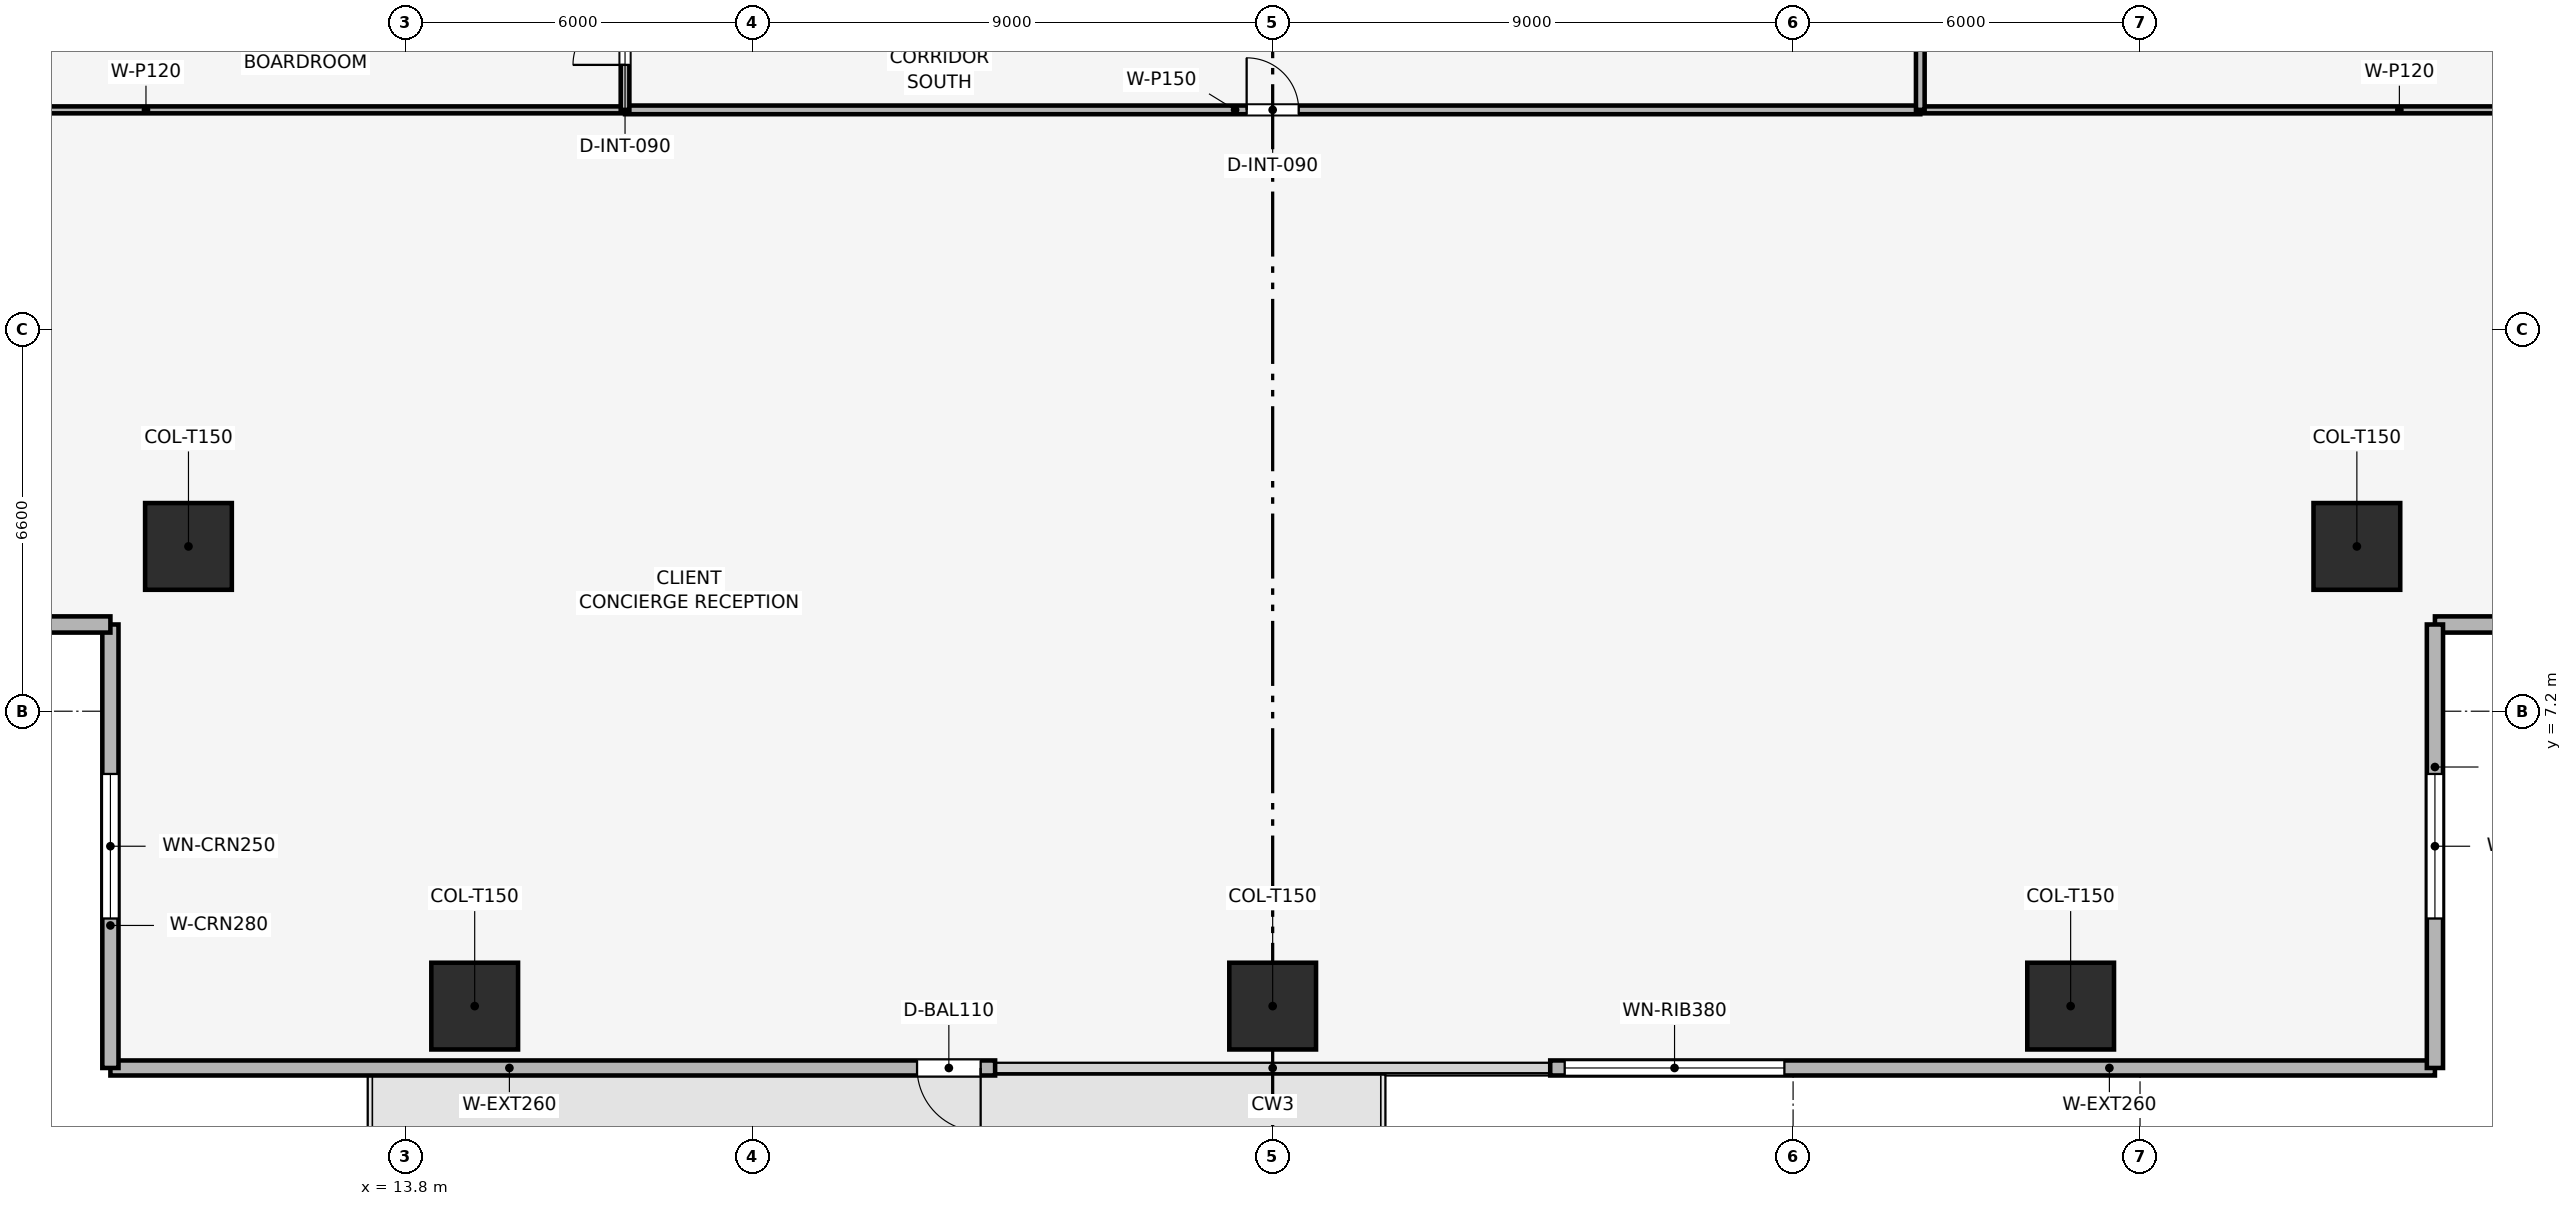
"""IFC4 building model, lengths in metres.
Left out: names, types, materials, properties, quantities, classifications, styles, units other than length and angle.
Written with IfcOpenShell. Run it as: python <this file> out.ifc"""

import sys

from ifc_helpers import new_model, si_unit, direction, frame, frame_2d, origin, origin_2d, place, context, subcontext, project, spatial, rectangle, extrude, element, fill, save


model = new_model("IFC4")
c1 = context("Model", 3, precision=1e-05, world=origin(), true_north=direction((0.0, 1.0)))
c2 = subcontext(c1, "Body", "Model", "MODEL_VIEW")
j1 = project(units=[si_unit("LENGTHUNIT", "METRE"), si_unit("PLANEANGLEUNIT", "RADIAN")], contexts=[c1])
p1 = place(None, origin())
s1 = spatial("IfcSite", under=j1, at=p1, CompositionType="ELEMENT")
p2 = place(p1, origin())
s2 = spatial("IfcBuilding", under=s1, at=p2, CompositionType="ELEMENT")
p3 = place(p2, frame((0.0, 0.0, 100.2)))
s3 = spatial("IfcBuildingStorey", under=s2, at=p3, CompositionType="ELEMENT", Elevation=100.2)
for number, where, z_axis, x_axis in (
    (1, (15.0, 2.1, 0.003), (0.0, 0.0, 1.0), (1.0, 0.0, 0.0)),
    (2, (28.8, 2.1, 0.003), (0.0, 0.0, 1.0), (1.0, 0.0, 0.0)),
    (3, (42.6, 2.1, 0.003), (0.0, 0.0, 1.0), (1.0, 0.0, 0.0)),
    (4, (10.05, 10.05, 0.003), (0.0, 0.0, 1.0), (1.0, 0.0, 0.0)),
    (5, (47.55, 10.05, 0.003), (0.0, 0.0, 1.0), (1.0, 0.0, 0.0)),
):
    element("IfcColumn", number, at=place(p3, frame(where, z_axis=z_axis, x_axis=x_axis)), inside=s3, PredefinedType="COLUMN", context=c2, shape_type="SweptSolid", body=[
        extrude(rectangle(XDim=1.5, YDim=1.5, at=origin_2d()), origin(), (0.0, 0.0, 1.0), 3.644),
    ])
p4 = place(p3, frame((48.9, 1.03, 0.0), z_axis=(0.0, 0.0, 1.0), x_axis=(-1.0, 0.0, 0.0)))
e6 = element("IfcWall", 6, at=p4, inside=s3, PredefinedType="SOLIDWALL", context=c2, shape_type="SweptSolid", body=[
    extrude(rectangle(XDim=15.3, YDim=0.26, at=frame_2d((7.65, 0.0))), origin(), (0.0, 0.0, 1.0), 3.65),
])
p5 = place(p4, frame((11.25, 0.0, 0.9)))
e7 = element("IfcOpeningElement", 7, at=p5, cuts=e6, PredefinedType="OPENING", context=c2, shape_type="SweptSolid", body=[
    extrude(rectangle(XDim=3.8, YDim=1.9, at=frame_2d((1.9, 0.95))), frame((0.0, 0.14, 0.0), z_axis=(0.0, -1.0, 0.0), x_axis=(1.0, 0.0, 0.0)), (0.0, 0.0, 1.0), 0.28),
])
p6 = place(p3, frame((24.0, 1.03, 0.0), z_axis=(0.0, 0.0, 1.0), x_axis=(-1.0, 0.0, 0.0)))
e8 = element("IfcWall", 8, at=p6, inside=s3, PredefinedType="SOLIDWALL", context=c2, shape_type="SweptSolid", body=[
    extrude(rectangle(XDim=15.3, YDim=0.26, at=frame_2d((7.65, 0.0))), origin(), (0.0, 0.0, 1.0), 3.65),
])
p7 = place(p6, frame((0.25, 0.0, 0.0)))
e9 = element("IfcOpeningElement", 9, at=p7, cuts=e8, PredefinedType="OPENING", context=c2, shape_type="SweptSolid", body=[
    extrude(rectangle(XDim=1.1, YDim=2.2, at=frame_2d((0.55, 1.1))), frame((0.0, 0.14, 0.0), z_axis=(0.0, -1.0, 0.0), x_axis=(1.0, 0.0, 0.0)), (0.0, 0.0, 1.0), 0.28),
])
p8 = place(p3, frame((8.7, 1.03, 0.0), z_axis=(0.0, 0.0, 1.0), x_axis=(0.0, 1.0, 0.0)))
e10 = element("IfcWall", 10, at=p8, inside=s3, PredefinedType="SOLIDWALL", context=c2, shape_type="SweptSolid", body=[
    extrude(rectangle(XDim=7.67, YDim=0.28, at=frame_2d((3.835, 0.0))), origin(), (0.0, 0.0, 1.0), 3.65),
])
p9 = place(p8, frame((2.585, 0.0, 0.9)))
e11 = element("IfcOpeningElement", 11, at=p9, cuts=e10, PredefinedType="OPENING", context=c2, shape_type="SweptSolid", body=[
    extrude(rectangle(XDim=2.5, YDim=1.9, at=frame_2d((1.25, 0.95))), frame((0.0, 0.15, 0.0), z_axis=(0.0, -1.0, 0.0), x_axis=(1.0, 0.0, 0.0)), (0.0, 0.0, 1.0), 0.3),
])
p10 = place(p3, frame((8.7, 8.7, 0.0), z_axis=(0.0, 0.0, 1.0), x_axis=(-1.0, 0.0, 0.0)))
e12 = element("IfcWall", 12, at=p10, inside=s3, PredefinedType="SOLIDWALL", context=c2, shape_type="SweptSolid", body=[
    extrude(rectangle(XDim=7.67, YDim=0.28, at=frame_2d((3.835, 0.0))), origin(), (0.0, 0.0, 1.0), 3.65),
])
p11 = place(p10, frame((2.585, 0.0, 0.9)))
e13 = element("IfcOpeningElement", 13, at=p11, cuts=e12, PredefinedType="OPENING", context=c2, shape_type="SweptSolid", body=[
    extrude(rectangle(XDim=2.5, YDim=1.9, at=frame_2d((1.25, 0.95))), frame((0.0, 0.15, 0.0), z_axis=(0.0, -1.0, 0.0), x_axis=(1.0, 0.0, 0.0)), (0.0, 0.0, 1.0), 0.3),
])
p12 = place(p3, frame((56.57, 8.7, 0.0), z_axis=(0.0, 0.0, 1.0), x_axis=(-1.0, 0.0, 0.0)))
e14 = element("IfcWall", 14, at=p12, inside=s3, PredefinedType="SOLIDWALL", context=c2, shape_type="SweptSolid", body=[
    extrude(rectangle(XDim=7.67, YDim=0.28, at=frame_2d((3.835, 0.0))), origin(), (0.0, 0.0, 1.0), 3.65),
])
p13 = place(p12, frame((2.585, 0.0, 0.9)))
e15 = element("IfcOpeningElement", 15, at=p13, cuts=e14, PredefinedType="OPENING", context=c2, shape_type="SweptSolid", body=[
    extrude(rectangle(XDim=2.5, YDim=1.9, at=frame_2d((1.25, 0.95))), frame((0.0, 0.15, 0.0), z_axis=(0.0, -1.0, 0.0), x_axis=(1.0, 0.0, 0.0)), (0.0, 0.0, 1.0), 0.3),
])
p14 = place(p3, frame((48.9, 8.7, 0.0), z_axis=(0.0, 0.0, 1.0), x_axis=(0.0, -1.0, 0.0)))
e16 = element("IfcWall", 16, at=p14, inside=s3, PredefinedType="SOLIDWALL", context=c2, shape_type="SweptSolid", body=[
    extrude(rectangle(XDim=7.67, YDim=0.28, at=frame_2d((3.835, 0.0))), origin(), (0.0, 0.0, 1.0), 3.65),
])
p15 = place(p14, frame((2.585, 0.0, 0.9)))
e17 = element("IfcOpeningElement", 17, at=p15, cuts=e16, PredefinedType="OPENING", context=c2, shape_type="SweptSolid", body=[
    extrude(rectangle(XDim=2.5, YDim=1.9, at=frame_2d((1.25, 0.95))), frame((0.0, 0.15, 0.0), z_axis=(0.0, -1.0, 0.0), x_axis=(1.0, 0.0, 0.0)), (0.0, 0.0, 1.0), 0.3),
])
for number, where, z_axis, x_axis in (
    (18, (1.03, 17.6, 0.0), (0.0, 0.0, 1.0), (1.0, 0.0, 0.0)),
    (19, (40.0, 17.6, 0.0), (0.0, 0.0, 1.0), (1.0, 0.0, 0.0)),
):
    element("IfcWall", number, at=place(p3, frame(where, z_axis=z_axis, x_axis=x_axis)), inside=s3, PredefinedType="PARTITIONING", context=c2, shape_type="SweptSolid", body=[
        extrude(rectangle(XDim=16.57, YDim=0.12, at=frame_2d((8.285, 0.0))), origin(), (0.0, 0.0, 1.0), 2.935),
    ])
p16 = place(p3, frame((17.6, 17.6, 0.0), z_axis=(0.0, 0.0, 1.0), x_axis=(1.0, 0.0, 0.0)))
e20 = element("IfcWall", 20, at=p16, inside=s3, PredefinedType="PARTITIONING", context=c2, shape_type="SweptSolid", body=[
    extrude(rectangle(XDim=22.4, YDim=0.15, at=frame_2d((11.2, 0.0))), origin(), (0.0, 0.0, 1.0), 3.085),
])
p17 = place(p16, frame((10.75, 0.0, 0.0)))
e21 = element("IfcOpeningElement", 21, at=p17, cuts=e20, PredefinedType="OPENING", context=c2, shape_type="SweptSolid", body=[
    extrude(rectangle(XDim=0.9, YDim=2.1, at=frame_2d((0.45, 1.05))), frame((0.0, 0.085, 0.0), z_axis=(0.0, -1.0, 0.0), x_axis=(1.0, 0.0, 0.0)), (0.0, 0.0, 1.0), 0.17),
])
p18 = place(p3, frame((17.6, 17.6, 0.0), z_axis=(0.0, 0.0, 1.0), x_axis=(0.0, 1.0, 0.0)))
e22 = element("IfcWall", 22, at=p18, inside=s3, PredefinedType="PARTITIONING", context=c2, shape_type="SweptSolid", body=[
    extrude(rectangle(XDim=22.4, YDim=0.15, at=frame_2d((11.2, 0.0))), origin(), (0.0, 0.0, 1.0), 3.085),
])
p19 = place(p18, frame((0.778, 0.0, 0.0)))
e23 = element("IfcOpeningElement", 23, at=p19, cuts=e22, PredefinedType="OPENING", context=c2, shape_type="SweptSolid", body=[
    extrude(rectangle(XDim=0.9, YDim=2.1, at=frame_2d((0.45, 1.05))), frame((0.0, 0.085, 0.0), z_axis=(0.0, -1.0, 0.0), x_axis=(1.0, 0.0, 0.0)), (0.0, 0.0, 1.0), 0.17),
])
p20 = place(p18, frame((6.372, 0.0, 0.0)))
e24 = element("IfcOpeningElement", 24, at=p20, cuts=e22, PredefinedType="OPENING", context=c2, shape_type="SweptSolid", body=[
    extrude(rectangle(XDim=0.9, YDim=2.1, at=frame_2d((0.45, 1.05))), frame((0.0, 0.085, 0.0), z_axis=(0.0, -1.0, 0.0), x_axis=(1.0, 0.0, 0.0)), (0.0, 0.0, 1.0), 0.17),
])
p21 = place(p18, frame((16.343, 0.0, 0.0)))
e25 = element("IfcOpeningElement", 25, at=p21, cuts=e22, PredefinedType="OPENING", context=c2, shape_type="SweptSolid", body=[
    extrude(rectangle(XDim=0.9, YDim=2.1, at=frame_2d((0.45, 1.05))), frame((0.0, 0.085, 0.0), z_axis=(0.0, -1.0, 0.0), x_axis=(1.0, 0.0, 0.0)), (0.0, 0.0, 1.0), 0.17),
])
p22 = place(p3, frame((40.0, 17.6, 0.0), z_axis=(0.0, 0.0, 1.0), x_axis=(0.0, 1.0, 0.0)))
e26 = element("IfcWall", 26, at=p22, inside=s3, PredefinedType="PARTITIONING", context=c2, shape_type="SweptSolid", body=[
    extrude(rectangle(XDim=22.4, YDim=0.15, at=frame_2d((11.2, 0.0))), origin(), (0.0, 0.0, 1.0), 3.085),
])
p23 = place(p22, frame((1.4, 0.0, 0.0)))
e27 = element("IfcOpeningElement", 27, at=p23, cuts=e26, PredefinedType="OPENING", context=c2, shape_type="SweptSolid", body=[
    extrude(rectangle(XDim=0.9, YDim=2.1, at=frame_2d((0.45, 1.05))), frame((0.0, 0.085, 0.0), z_axis=(0.0, -1.0, 0.0), x_axis=(1.0, 0.0, 0.0)), (0.0, 0.0, 1.0), 0.17),
])
p24 = place(p22, frame((4.65, 0.0, 0.0)))
e28 = element("IfcOpeningElement", 28, at=p24, cuts=e26, PredefinedType="OPENING", context=c2, shape_type="SweptSolid", body=[
    extrude(rectangle(XDim=0.9, YDim=2.1, at=frame_2d((0.45, 1.05))), frame((0.0, 0.085, 0.0), z_axis=(0.0, -1.0, 0.0), x_axis=(1.0, 0.0, 0.0)), (0.0, 0.0, 1.0), 0.17),
])
p25 = place(p22, frame((7.55, 0.0, 0.0)))
e29 = element("IfcOpeningElement", 29, at=p25, cuts=e26, PredefinedType="OPENING", context=c2, shape_type="SweptSolid", body=[
    extrude(rectangle(XDim=0.9, YDim=2.1, at=frame_2d((0.45, 1.05))), frame((0.0, 0.085, 0.0), z_axis=(0.0, -1.0, 0.0), x_axis=(1.0, 0.0, 0.0)), (0.0, 0.0, 1.0), 0.17),
])
p26 = place(p22, frame((10.3, 0.0, 0.0)))
e30 = element("IfcOpeningElement", 30, at=p26, cuts=e26, PredefinedType="OPENING", context=c2, shape_type="SweptSolid", body=[
    extrude(rectangle(XDim=0.95, YDim=2.1, at=frame_2d((0.475, 1.05))), frame((0.0, 0.085, 0.0), z_axis=(0.0, -1.0, 0.0), x_axis=(1.0, 0.0, 0.0)), (0.0, 0.0, 1.0), 0.17),
])
p27 = place(p22, frame((16.8, 0.0, 0.0)))
e31 = element("IfcOpeningElement", 31, at=p27, cuts=e26, PredefinedType="OPENING", context=c2, shape_type="SweptSolid", body=[
    extrude(rectangle(XDim=0.9, YDim=2.1, at=frame_2d((0.45, 1.05))), frame((0.0, 0.085, 0.0), z_axis=(0.0, -1.0, 0.0), x_axis=(1.0, 0.0, 0.0)), (0.0, 0.0, 1.0), 0.17),
])
p28 = place(p7, origin())
e32 = element("IfcDoor", 32, at=p28, inside=s3, OperationType="SINGLE_SWING_LEFT", PredefinedType="DOOR", context=c2, shape_type="SweptSolid", body=[
    extrude(rectangle(XDim=1.1, YDim=2.2, at=frame_2d((0.55, 1.1))), frame((0.0, 0.025, 0.0), z_axis=(0.0, -1.0, 0.0), x_axis=(1.0, 0.0, 0.0)), (0.0, 0.0, 1.0), 0.05),
])
fill(e9, e32)
p29 = place(p5, origin())
e33 = element("IfcWindow", 33, at=p29, inside=s3, PartitioningType="SINGLE_PANEL", PredefinedType="WINDOW", context=c2, shape_type="SweptSolid", body=[
    extrude(rectangle(XDim=3.8, YDim=1.9, at=frame_2d((1.9, 0.95))), frame((0.0, 0.03, 0.0), z_axis=(0.0, -1.0, 0.0), x_axis=(1.0, 0.0, 0.0)), (0.0, 0.0, 1.0), 0.06),
])
fill(e7, e33)
p30 = place(p9, origin())
e34 = element("IfcWindow", 34, at=p30, inside=s3, PartitioningType="SINGLE_PANEL", PredefinedType="WINDOW", context=c2, shape_type="SweptSolid", body=[
    extrude(rectangle(XDim=2.5, YDim=1.9, at=frame_2d((1.25, 0.95))), frame((0.0, 0.03, 0.0), z_axis=(0.0, -1.0, 0.0), x_axis=(1.0, 0.0, 0.0)), (0.0, 0.0, 1.0), 0.06),
])
fill(e11, e34)
p31 = place(p15, origin())
e35 = element("IfcWindow", 35, at=p31, inside=s3, PartitioningType="SINGLE_PANEL", PredefinedType="WINDOW", context=c2, shape_type="SweptSolid", body=[
    extrude(rectangle(XDim=2.5, YDim=1.9, at=frame_2d((1.25, 0.95))), frame((0.0, 0.03, 0.0), z_axis=(0.0, -1.0, 0.0), x_axis=(1.0, 0.0, 0.0)), (0.0, 0.0, 1.0), 0.06),
])
fill(e17, e35)
p32 = place(p17, origin())
e36 = element("IfcDoor", 36, at=p32, inside=s3, OperationType="SINGLE_SWING_LEFT", PredefinedType="DOOR", context=c2, shape_type="SweptSolid", body=[
    extrude(rectangle(XDim=0.9, YDim=2.1, at=frame_2d((0.45, 1.05))), frame((0.0, 0.025, 0.0), z_axis=(0.0, -1.0, 0.0), x_axis=(1.0, 0.0, 0.0)), (0.0, 0.0, 1.0), 0.05),
])
fill(e21, e36)
p33 = place(p19, origin())
e37 = element("IfcDoor", 37, at=p33, inside=s3, OperationType="SINGLE_SWING_LEFT", PredefinedType="DOOR", context=c2, shape_type="SweptSolid", body=[
    extrude(rectangle(XDim=0.9, YDim=2.1, at=frame_2d((0.45, 1.05))), frame((0.0, 0.025, 0.0), z_axis=(0.0, -1.0, 0.0), x_axis=(1.0, 0.0, 0.0)), (0.0, 0.0, 1.0), 0.05),
])
fill(e23, e37)
save(model, sys.argv[1])
